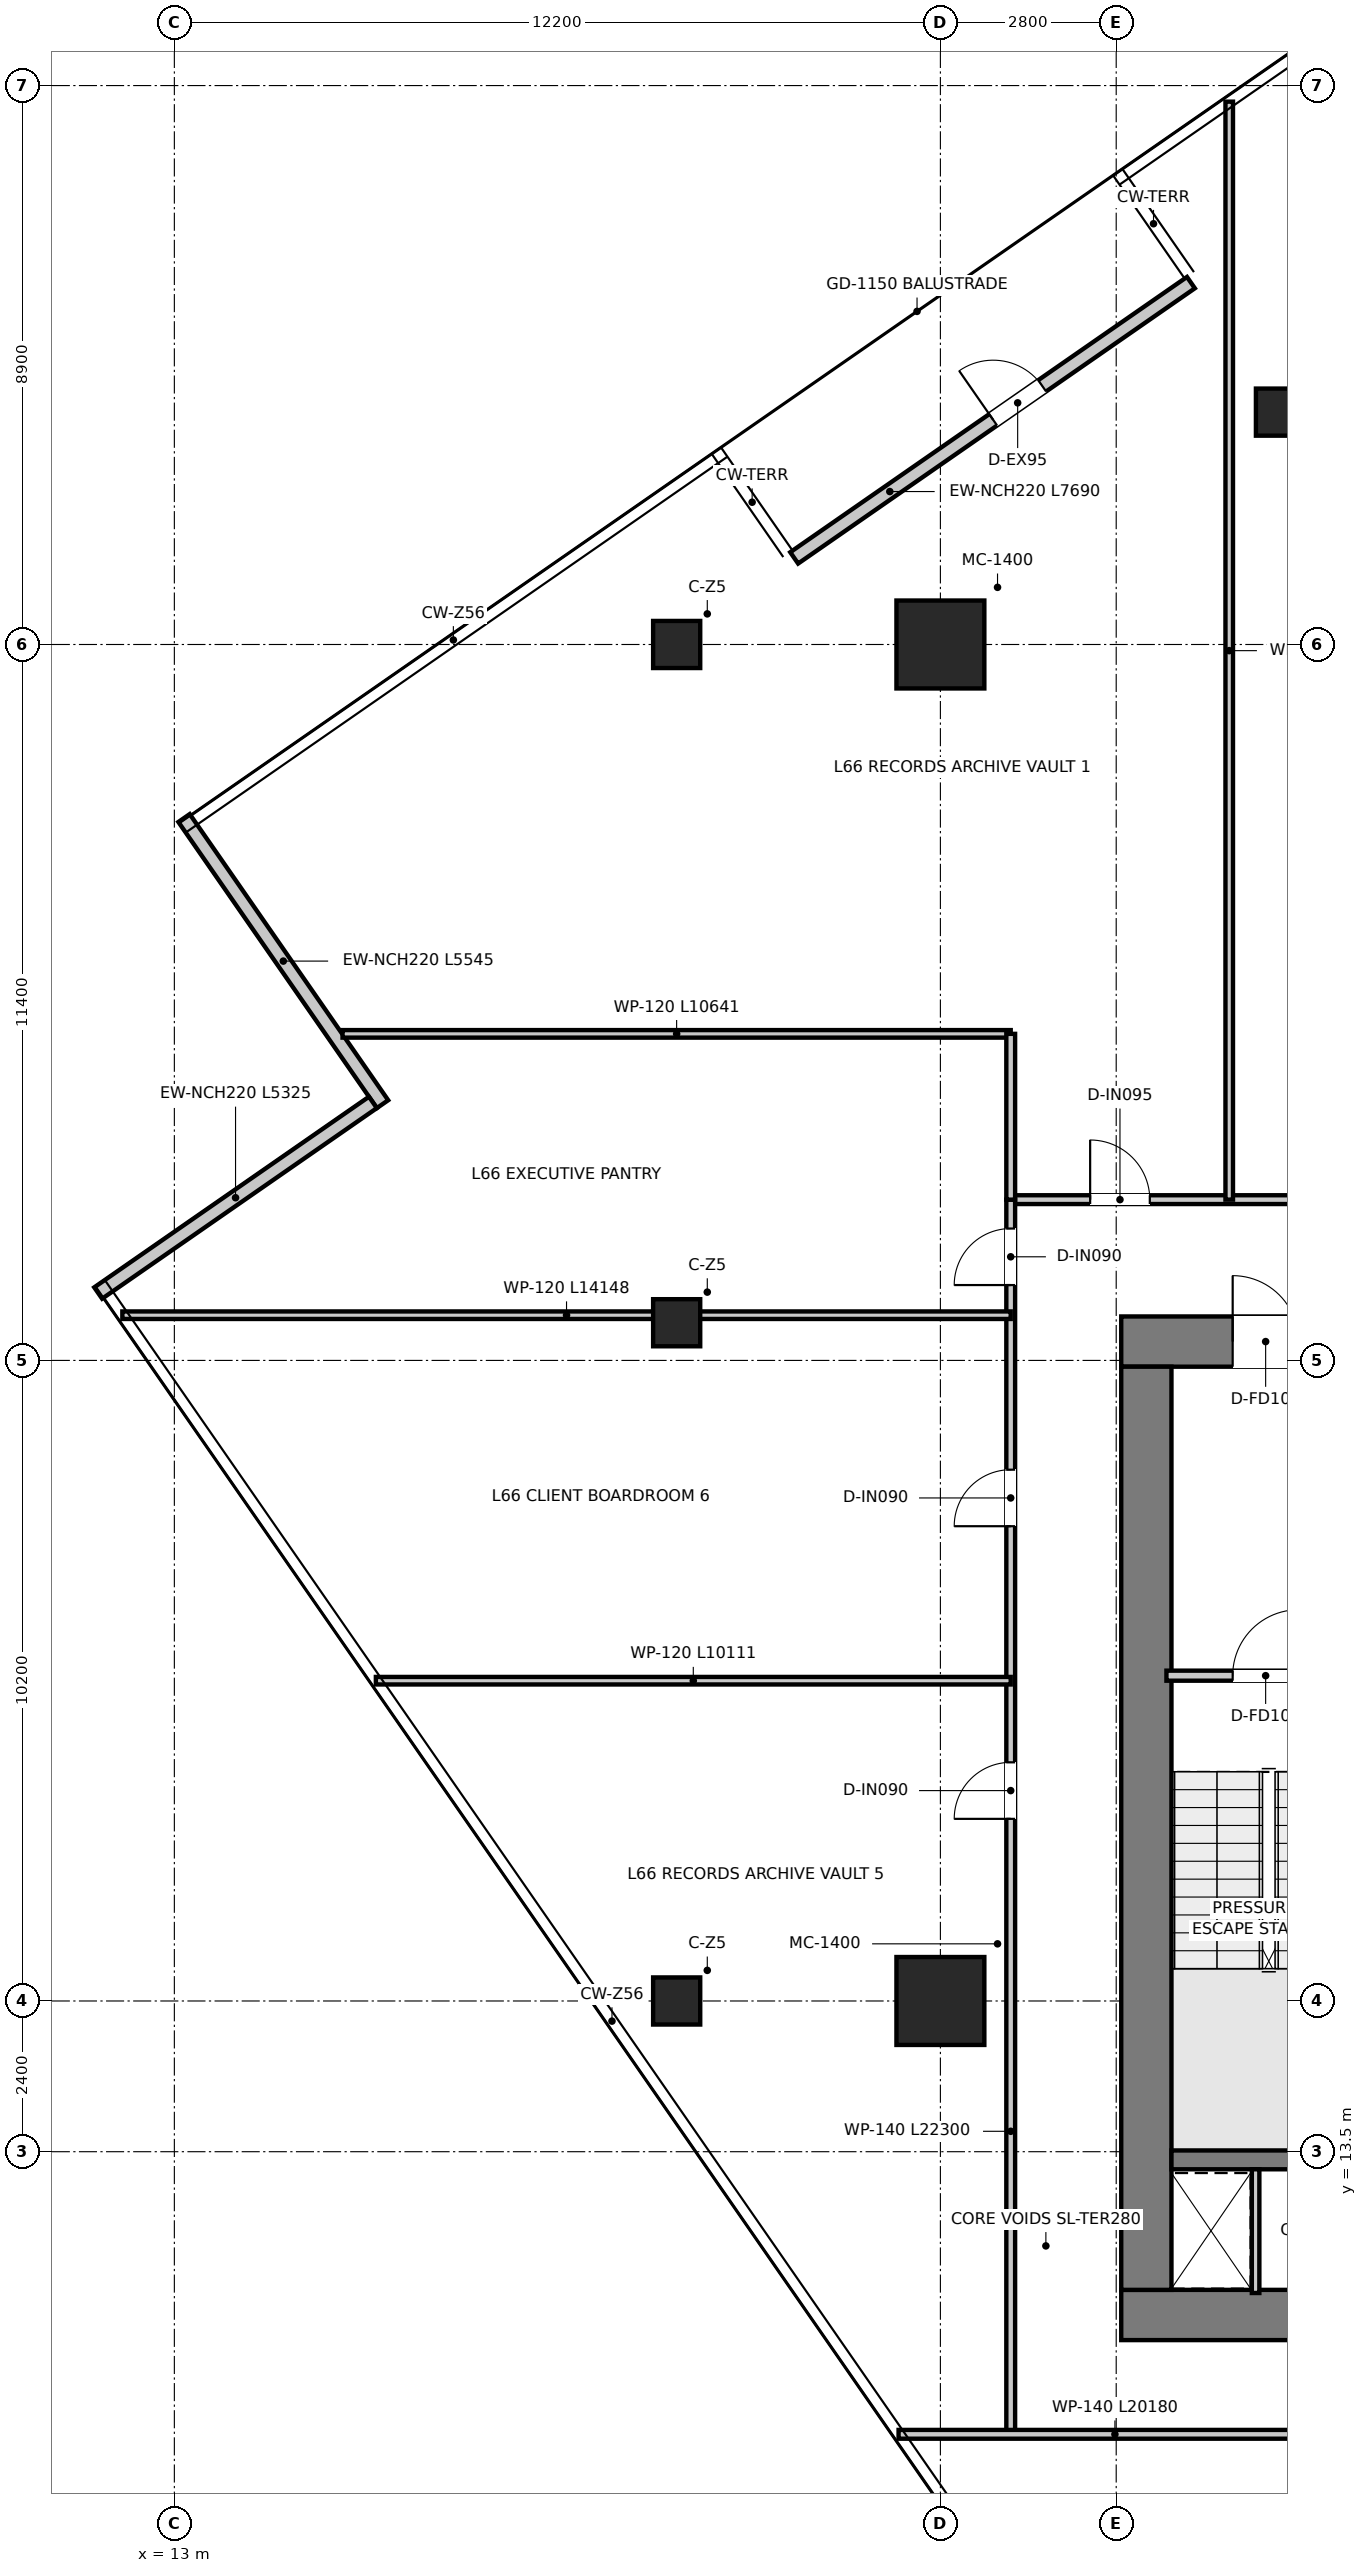
"""IFC4 building model, lengths in metres.
Left out: names, types, materials, properties, quantities, classifications, styles, units other than length and angle.
Written with IfcOpenShell. Run it as: python <this file> out.ifc"""

import sys

from ifc_helpers import new_model, si_unit, direction, frame, frame_2d, origin, origin_2d, place, context, subcontext, project, spatial, rectangle, extrude, source, transform, mapped, element, fill, save


model = new_model("IFC4")
c1 = context("Model", 3, precision=1e-05, world=origin(), true_north=direction((0.0, 1.0)))
c2 = subcontext(c1, "Body", "Model", "MODEL_VIEW")
j1 = project(units=[si_unit("LENGTHUNIT", "METRE"), si_unit("PLANEANGLEUNIT", "RADIAN")], contexts=[c1])
p1 = place(None, origin())
s1 = spatial("IfcSite", under=j1, at=p1, CompositionType="ELEMENT")
p2 = place(p1, origin())
s2 = spatial("IfcBuilding", under=s1, at=p2, CompositionType="ELEMENT")
p3 = place(p2, frame((0.0, 0.0, 271.35)))
s3 = spatial("IfcBuildingStorey", under=s2, at=p3, CompositionType="ELEMENT", Elevation=271.35)
p4 = place(p3, frame((28.08, 10.9, 0.0), z_axis=(0.0, 0.0, 1.0), x_axis=(1.0, 0.0, 0.0)))
e1 = element("IfcWall", 1, at=p4, inside=s3, PredefinedType="SHEAR", context=c2, shape_type="SweptSolid", body=[
    extrude(rectangle(XDim=15.84, YDim=0.8, at=frame_2d((7.92, 0.0))), origin(), (0.0, 0.0, 1.0), 3.95),
])
p5 = place(p3, frame((28.08, 26.4, 0.0), z_axis=(0.0, 0.0, 1.0), x_axis=(1.0, 0.0, 0.0)))
e2 = element("IfcWall", 2, at=p5, inside=s3, PredefinedType="SHEAR", context=c2, shape_type="SweptSolid", body=[
    extrude(rectangle(XDim=15.84, YDim=0.8, at=frame_2d((7.92, 0.0))), origin(), (0.0, 0.0, 1.0), 3.95),
])
p6 = place(p5, frame((7.22, 0.0, 0.0)))
e3 = element("IfcOpeningElement", 3, at=p6, cuts=e2, PredefinedType="OPENING", context=c2, shape_type="SweptSolid", body=[
    extrude(rectangle(XDim=1.4, YDim=2.2, at=frame_2d((0.7, 1.1))), frame((0.0, 0.41, 0.0), z_axis=(0.0, -1.0, 0.0), x_axis=(1.0, 0.0, 0.0)), (0.0, 0.0, 1.0), 0.82),
])
p7 = place(p5, frame((1.775, 0.0, 0.0)))
e4 = element("IfcOpeningElement", 4, at=p7, cuts=e2, PredefinedType="OPENING", context=c2, shape_type="SweptSolid", body=[
    extrude(rectangle(XDim=1.05, YDim=2.1, at=frame_2d((0.525, 1.05))), frame((0.0, 0.41, 0.0), z_axis=(0.0, -1.0, 0.0), x_axis=(1.0, 0.0, 0.0)), (0.0, 0.0, 1.0), 0.82),
])
p8 = place(p5, frame((13.015, 0.0, 0.0)))
e5 = element("IfcOpeningElement", 5, at=p8, cuts=e2, PredefinedType="OPENING", context=c2, shape_type="SweptSolid", body=[
    extrude(rectangle(XDim=1.05, YDim=2.1, at=frame_2d((0.525, 1.05))), frame((0.0, 0.41, 0.0), z_axis=(0.0, -1.0, 0.0), x_axis=(1.0, 0.0, 0.0)), (0.0, 0.0, 1.0), 0.82),
])
p9 = place(p3, frame((28.48, 11.3, 0.0), z_axis=(0.0, 0.0, 1.0), x_axis=(0.0, 1.0, 0.0)))
e6 = element("IfcWall", 6, at=p9, inside=s3, PredefinedType="SHEAR", context=c2, shape_type="SweptSolid", body=[
    extrude(rectangle(XDim=14.7, YDim=0.8, at=frame_2d((7.35, 0.0))), origin(), (0.0, 0.0, 1.0), 3.95),
])
p10 = place(p3, frame((28.88, 13.37, 0.0), z_axis=(0.0, 0.0, 1.0), x_axis=(1.0, 0.0, 0.0)))
e7 = element("IfcWall", 7, at=p10, inside=s3, PredefinedType="SHEAR", context=c2, shape_type="SweptSolid", body=[
    extrude(rectangle(XDim=3.1, YDim=0.3, at=frame_2d((1.55, 0.0))), origin(), (0.0, 0.0, 1.0), 3.95),
])
m1 = source(origin(), c2, "Body", "SweptSolid", [
    extrude(rectangle(XDim=1.4, YDim=1.4, at=origin_2d()), origin(), (0.0, 0.0, 1.0), 3.95),
])
for number, where, z_axis, x_axis in (
    (8, (25.2, 15.9, 0.0), (0.0, 0.0, 1.0), (1.0, 0.0, 0.0)),
    (9, (25.2, 37.5, 0.0), (0.0, 0.0, 1.0), (1.0, 0.0, 0.0)),
):
    element("IfcColumn", number, at=place(p3, frame(where, z_axis=z_axis, x_axis=x_axis)), inside=s3, PredefinedType="USERDEFINED", context=c2, shape_type="MappedRepresentation", body=[
        mapped(m1, transform((0.0, 0.0, 0.0), x_axis=(1.0, 0.0, 0.0), y_axis=(0.0, 1.0, 0.0), z_axis=(0.0, 0.0, 1.0), scale=1.0)),
    ])
m2 = source(origin(), c2, "Body", "SweptSolid", [
    extrude(rectangle(XDim=0.75, YDim=0.75, at=origin_2d()), origin(), (0.0, 0.0, 1.0), 3.95),
])
for number, where, z_axis, x_axis in (
    (10, (21.0, 15.9, 0.0), (0.0, 0.0, 1.0), (1.0, 0.0, 0.0)),
    (11, (21.0, 26.7, 0.0), (0.0, 0.0, 1.0), (1.0, 0.0, 0.0)),
    (12, (21.0, 37.5, 0.0), (0.0, 0.0, 1.0), (1.0, 0.0, 0.0)),
    (13, (30.6, 41.2, 0.0), (0.0, 0.0, 1.0), (1.0, 0.0, 0.0)),
):
    element("IfcColumn", number, at=place(p3, frame(where, z_axis=z_axis, x_axis=x_axis)), inside=s3, PredefinedType="COLUMN", context=c2, shape_type="MappedRepresentation", body=[
        mapped(m2, transform((0.0, 0.0, 0.0), x_axis=(1.0, 0.0, 0.0), y_axis=(0.0, 1.0, 0.0), z_axis=(0.0, 0.0, 1.0), scale=1.0)),
    ])
p11 = place(p3, frame((22.872, 38.879, 0.0), z_axis=(0.0, 0.0, 1.0), x_axis=(0.821640913491, 0.570005446709, 0.0)))
e14 = element("IfcWall", 14, at=p11, inside=s3, PredefinedType="ELEMENTEDWALL", context=c2, shape_type="SweptSolid", body=[
    extrude(rectangle(XDim=7.69, YDim=0.22, at=frame_2d((3.845, 0.0))), origin(), (0.0, 0.0, 1.0), 3.67),
])
p12 = place(p11, frame((3.857, 0.0, 0.0)))
e15 = element("IfcOpeningElement", 15, at=p12, cuts=e14, PredefinedType="OPENING", context=c2, shape_type="SweptSolid", body=[
    extrude(rectangle(XDim=0.95, YDim=2.1, at=frame_2d((0.475, 1.05))), frame((0.0, 0.12, 0.0), z_axis=(0.0, -1.0, 0.0), x_axis=(1.0, 0.0, 0.0)), (0.0, 0.0, 1.0), 0.24),
])
p13 = place(p3, frame((13.155, 34.737, 0.0), z_axis=(0.0, 0.0, 1.0), x_axis=(0.569988141022, -0.821652918874, 0.0)))
e16 = element("IfcWall", 16, at=p13, inside=s3, PredefinedType="ELEMENTEDWALL", context=c2, shape_type="SweptSolid", body=[
    extrude(rectangle(XDim=5.545, YDim=0.22, at=frame_2d((2.772, 0.0))), origin(), (0.0, 0.0, 1.0), 3.67),
])
p14 = place(p3, frame((16.162, 30.208, 0.0), z_axis=(0.0, 0.0, 1.0), x_axis=(-0.821652092748, -0.569989331903, 0.0)))
e17 = element("IfcWall", 17, at=p14, inside=s3, PredefinedType="ELEMENTEDWALL", context=c2, shape_type="SweptSolid", body=[
    extrude(rectangle(XDim=5.325, YDim=0.22, at=frame_2d((2.663, 0.0))), origin(), (0.0, 0.0, 1.0), 3.67),
])
p15 = place(p3, frame((28.8, 21.08, 0.0), z_axis=(0.0, 0.0, 1.0), x_axis=(1.0, 0.0, 0.0)))
e18 = element("IfcWall", 18, at=p15, inside=s3, PredefinedType="PARTITIONING", context=c2, shape_type="SweptSolid", body=[
    extrude(rectangle(XDim=3.16, YDim=0.16, at=frame_2d((1.58, 0.0))), origin(), (0.0, 0.0, 1.0), 3.67),
])
p16 = place(p15, frame((1.055, 0.0, 0.0)))
e19 = element("IfcOpeningElement", 19, at=p16, cuts=e18, PredefinedType="OPENING", context=c2, shape_type="SweptSolid", body=[
    extrude(rectangle(XDim=1.05, YDim=2.1, at=frame_2d((0.525, 1.05))), frame((0.0, 0.09, 0.0), z_axis=(0.0, -1.0, 0.0), x_axis=(1.0, 0.0, 0.0)), (0.0, 0.0, 1.0), 0.18),
])
p17 = place(p3, frame((30.22, 11.25, 0.0), z_axis=(0.0, 0.0, 1.0), x_axis=(0.0, 1.0, 0.0)))
e20 = element("IfcWall", 20, at=p17, inside=s3, PredefinedType="PARTITIONING", context=c2, shape_type="SweptSolid", body=[
    extrude(rectangle(XDim=1.97, YDim=0.12, at=frame_2d((0.985, 0.0))), origin(), (0.0, 0.0, 1.0), 3.67),
])
p18 = place(p3, frame((26.32, 28.66, 0.0), z_axis=(0.0, 0.0, 1.0), x_axis=(1.0, 0.0, 0.0)))
e21 = element("IfcWall", 21, at=p18, inside=s3, PredefinedType="PARTITIONING", context=c2, shape_type="SweptSolid", body=[
    extrude(rectangle(XDim=19.36, YDim=0.14, at=frame_2d((9.68, 0.0))), origin(), (0.0, 0.0, 1.0), 3.18),
])
p19 = place(p18, frame((1.265, 0.0, 0.0)))
e22 = element("IfcOpeningElement", 22, at=p19, cuts=e21, PredefinedType="OPENING", context=c2, shape_type="SweptSolid", body=[
    extrude(rectangle(XDim=0.95, YDim=2.1, at=frame_2d((0.475, 1.05))), frame((0.0, 0.08, 0.0), z_axis=(0.0, -1.0, 0.0), x_axis=(1.0, 0.0, 0.0)), (0.0, 0.0, 1.0), 0.16),
])
p20 = place(p18, frame((6.105, 0.0, 0.0)))
e23 = element("IfcOpeningElement", 23, at=p20, cuts=e21, PredefinedType="OPENING", context=c2, shape_type="SweptSolid", body=[
    extrude(rectangle(XDim=0.95, YDim=2.1, at=frame_2d((0.475, 1.05))), frame((0.0, 0.08, 0.0), z_axis=(0.0, -1.0, 0.0), x_axis=(1.0, 0.0, 0.0)), (0.0, 0.0, 1.0), 0.16),
])
p21 = place(p18, frame((12.305, 0.0, 0.0)))
e24 = element("IfcOpeningElement", 24, at=p21, cuts=e21, PredefinedType="OPENING", context=c2, shape_type="SweptSolid", body=[
    extrude(rectangle(XDim=0.95, YDim=2.1, at=frame_2d((0.475, 1.05))), frame((0.0, 0.08, 0.0), z_axis=(0.0, -1.0, 0.0), x_axis=(1.0, 0.0, 0.0)), (0.0, 0.0, 1.0), 0.16),
])
p22 = place(p18, frame((17.145, 0.0, 0.0)))
e25 = element("IfcOpeningElement", 25, at=p22, cuts=e21, PredefinedType="OPENING", context=c2, shape_type="SweptSolid", body=[
    extrude(rectangle(XDim=0.95, YDim=2.1, at=frame_2d((0.475, 1.05))), frame((0.0, 0.08, 0.0), z_axis=(0.0, -1.0, 0.0), x_axis=(1.0, 0.0, 0.0)), (0.0, 0.0, 1.0), 0.16),
])
p23 = place(p3, frame((26.32, 9.0, 0.0), z_axis=(0.0, 0.0, 1.0), x_axis=(0.0, 1.0, 0.0)))
e26 = element("IfcWall", 26, at=p23, inside=s3, PredefinedType="PARTITIONING", context=c2, shape_type="SweptSolid", body=[
    extrude(rectangle(XDim=19.66, YDim=0.14, at=frame_2d((9.83, 0.0))), origin(), (0.0, 0.0, 1.0), 3.13),
])
p24 = place(p23, frame((18.3, 0.0, 0.0)))
e27 = element("IfcOpeningElement", 27, at=p24, cuts=e26, PredefinedType="OPENING", context=c2, shape_type="SweptSolid", body=[
    extrude(rectangle(XDim=0.9, YDim=2.1, at=frame_2d((0.45, 1.05))), frame((0.0, 0.08, 0.0), z_axis=(0.0, -1.0, 0.0), x_axis=(1.0, 0.0, 0.0)), (0.0, 0.0, 1.0), 0.16),
])
p25 = place(p23, frame((9.8, 0.0, 0.0)))
e28 = element("IfcOpeningElement", 28, at=p25, cuts=e26, PredefinedType="OPENING", context=c2, shape_type="SweptSolid", body=[
    extrude(rectangle(XDim=0.9, YDim=2.1, at=frame_2d((0.45, 1.05))), frame((0.0, 0.08, 0.0), z_axis=(0.0, -1.0, 0.0), x_axis=(1.0, 0.0, 0.0)), (0.0, 0.0, 1.0), 0.16),
])
p26 = place(p23, frame((14.46, 0.0, 0.0)))
e29 = element("IfcOpeningElement", 29, at=p26, cuts=e26, PredefinedType="OPENING", context=c2, shape_type="SweptSolid", body=[
    extrude(rectangle(XDim=0.9, YDim=2.1, at=frame_2d((0.45, 1.05))), frame((0.0, 0.08, 0.0), z_axis=(0.0, -1.0, 0.0), x_axis=(1.0, 0.0, 0.0)), (0.0, 0.0, 1.0), 0.16),
])
p27 = place(p3, frame((24.534, 9.0, 0.0), z_axis=(0.0, 0.0, 1.0), x_axis=(1.0, 0.0, 0.0)))
e30 = element("IfcWall", 30, at=p27, inside=s3, PredefinedType="PARTITIONING", context=c2, shape_type="SweptSolid", body=[
    extrude(rectangle(XDim=20.18, YDim=0.14, at=frame_2d((10.09, 0.0))), origin(), (0.0, 0.0, 1.0), 3.67),
])
p28 = place(p27, frame((7.041, 0.0, 0.0)))
e31 = element("IfcOpeningElement", 31, at=p28, cuts=e30, PredefinedType="OPENING", context=c2, shape_type="SweptSolid", body=[
    extrude(rectangle(XDim=0.85, YDim=2.1, at=frame_2d((0.425, 1.05))), frame((0.0, 0.08, 0.0), z_axis=(0.0, -1.0, 0.0), x_axis=(1.0, 0.0, 0.0)), (0.0, 0.0, 1.0), 0.16),
])
p29 = place(p27, frame((15.041, 0.0, 0.0)))
e32 = element("IfcOpeningElement", 32, at=p29, cuts=e30, PredefinedType="OPENING", context=c2, shape_type="SweptSolid", body=[
    extrude(rectangle(XDim=0.85, YDim=2.1, at=frame_2d((0.425, 1.05))), frame((0.0, 0.08, 0.0), z_axis=(0.0, -1.0, 0.0), x_axis=(1.0, 0.0, 0.0)), (0.0, 0.0, 1.0), 0.16),
])
p30 = place(p3, frame((12.172, 26.82, 0.0), z_axis=(0.0, 0.0, 1.0), x_axis=(1.0, 0.0, 0.0)))
e33 = element("IfcWall", 33, at=p30, inside=s3, PredefinedType="PARTITIONING", context=c2, shape_type="SweptSolid", body=[
    extrude(rectangle(XDim=14.148, YDim=0.12, at=frame_2d((7.074, 0.0))), origin(), (0.0, 0.0, 1.0), 3.13),
])
p31 = place(p3, frame((15.679, 31.3, 0.0), z_axis=(0.0, 0.0, 1.0), x_axis=(1.0, 0.0, 0.0)))
e34 = element("IfcWall", 34, at=p31, inside=s3, PredefinedType="PARTITIONING", context=c2, shape_type="SweptSolid", body=[
    extrude(rectangle(XDim=10.641, YDim=0.12, at=frame_2d((5.321, 0.0))), origin(), (0.0, 0.0, 1.0), 3.13),
])
p32 = place(p3, frame((26.32, 28.66, 0.0), z_axis=(0.0, 0.0, 1.0), x_axis=(0.0, 1.0, 0.0)))
e35 = element("IfcWall", 35, at=p32, inside=s3, PredefinedType="PARTITIONING", context=c2, shape_type="SweptSolid", body=[
    extrude(rectangle(XDim=2.64, YDim=0.14, at=frame_2d((1.32, 0.0))), origin(), (0.0, 0.0, 1.0), 3.43),
])
p33 = place(p3, frame((29.8, 28.66, 0.0), z_axis=(0.0, 0.0, 1.0), x_axis=(0.0, 1.0, 0.0)))
e36 = element("IfcWall", 36, at=p33, inside=s3, PredefinedType="PARTITIONING", context=c2, shape_type="SweptSolid", body=[
    extrude(rectangle(XDim=17.484, YDim=0.12, at=frame_2d((8.742, 0.0))), origin(), (0.0, 0.0, 1.0), 3.13),
])
p34 = place(p3, frame((16.209, 21.0, 0.0), z_axis=(0.0, 0.0, 1.0), x_axis=(1.0, 0.0, 0.0)))
e37 = element("IfcWall", 37, at=p34, inside=s3, PredefinedType="PARTITIONING", context=c2, shape_type="SweptSolid", body=[
    extrude(rectangle(XDim=10.111, YDim=0.12, at=frame_2d((5.055, 0.0))), origin(), (0.0, 0.0, 1.0), 3.13),
])
p35 = place(p16, origin())
e38 = element("IfcDoor", 38, at=p35, inside=s3, OperationType="SINGLE_SWING_RIGHT", PredefinedType="DOOR", context=c2, shape_type="SweptSolid", body=[
    extrude(rectangle(XDim=1.05, YDim=2.1, at=frame_2d((0.525, 1.05))), frame((0.0, 0.025, 0.0), z_axis=(0.0, -1.0, 0.0), x_axis=(1.0, 0.0, 0.0)), (0.0, 0.0, 1.0), 0.05),
])
fill(e19, e38)
p36 = place(p7, origin())
e39 = element("IfcDoor", 39, at=p36, inside=s3, OperationType="SINGLE_SWING_LEFT", PredefinedType="DOOR", context=c2, shape_type="SweptSolid", body=[
    extrude(rectangle(XDim=1.05, YDim=2.1, at=frame_2d((0.525, 1.05))), frame((0.0, 0.025, 0.0), z_axis=(0.0, -1.0, 0.0), x_axis=(1.0, 0.0, 0.0)), (0.0, 0.0, 1.0), 0.05),
])
fill(e4, e39)
p37 = place(p24, origin())
e40 = element("IfcDoor", 40, at=p37, inside=s3, OperationType="SINGLE_SWING_LEFT", PredefinedType="DOOR", context=c2, shape_type="SweptSolid", body=[
    extrude(rectangle(XDim=0.9, YDim=2.1, at=frame_2d((0.45, 1.05))), frame((0.0, 0.025, 0.0), z_axis=(0.0, -1.0, 0.0), x_axis=(1.0, 0.0, 0.0)), (0.0, 0.0, 1.0), 0.05),
])
fill(e27, e40)
p38 = place(p19, origin())
e41 = element("IfcDoor", 41, at=p38, inside=s3, OperationType="SINGLE_SWING_LEFT", PredefinedType="DOOR", context=c2, shape_type="SweptSolid", body=[
    extrude(rectangle(XDim=0.95, YDim=2.1, at=frame_2d((0.475, 1.05))), frame((0.0, 0.025, 0.0), z_axis=(0.0, -1.0, 0.0), x_axis=(1.0, 0.0, 0.0)), (0.0, 0.0, 1.0), 0.05),
])
fill(e22, e41)
p39 = place(p25, origin())
e42 = element("IfcDoor", 42, at=p39, inside=s3, OperationType="SINGLE_SWING_LEFT", PredefinedType="DOOR", context=c2, shape_type="SweptSolid", body=[
    extrude(rectangle(XDim=0.9, YDim=2.1, at=frame_2d((0.45, 1.05))), frame((0.0, 0.025, 0.0), z_axis=(0.0, -1.0, 0.0), x_axis=(1.0, 0.0, 0.0)), (0.0, 0.0, 1.0), 0.05),
])
fill(e28, e42)
p40 = place(p26, origin())
e43 = element("IfcDoor", 43, at=p40, inside=s3, OperationType="SINGLE_SWING_LEFT", PredefinedType="DOOR", context=c2, shape_type="SweptSolid", body=[
    extrude(rectangle(XDim=0.9, YDim=2.1, at=frame_2d((0.45, 1.05))), frame((0.0, 0.025, 0.0), z_axis=(0.0, -1.0, 0.0), x_axis=(1.0, 0.0, 0.0)), (0.0, 0.0, 1.0), 0.05),
])
fill(e29, e43)
p41 = place(p12, origin())
e44 = element("IfcDoor", 44, at=p41, inside=s3, OperationType="SINGLE_SWING_LEFT", PredefinedType="DOOR", context=c2, shape_type="SweptSolid", body=[
    extrude(rectangle(XDim=0.95, YDim=2.1, at=frame_2d((0.475, 1.05))), frame((0.0, 0.025, 0.0), z_axis=(0.0, -1.0, 0.0), x_axis=(1.0, 0.0, 0.0)), (0.0, 0.0, 1.0), 0.05),
])
fill(e15, e44)
save(model, sys.argv[1])
